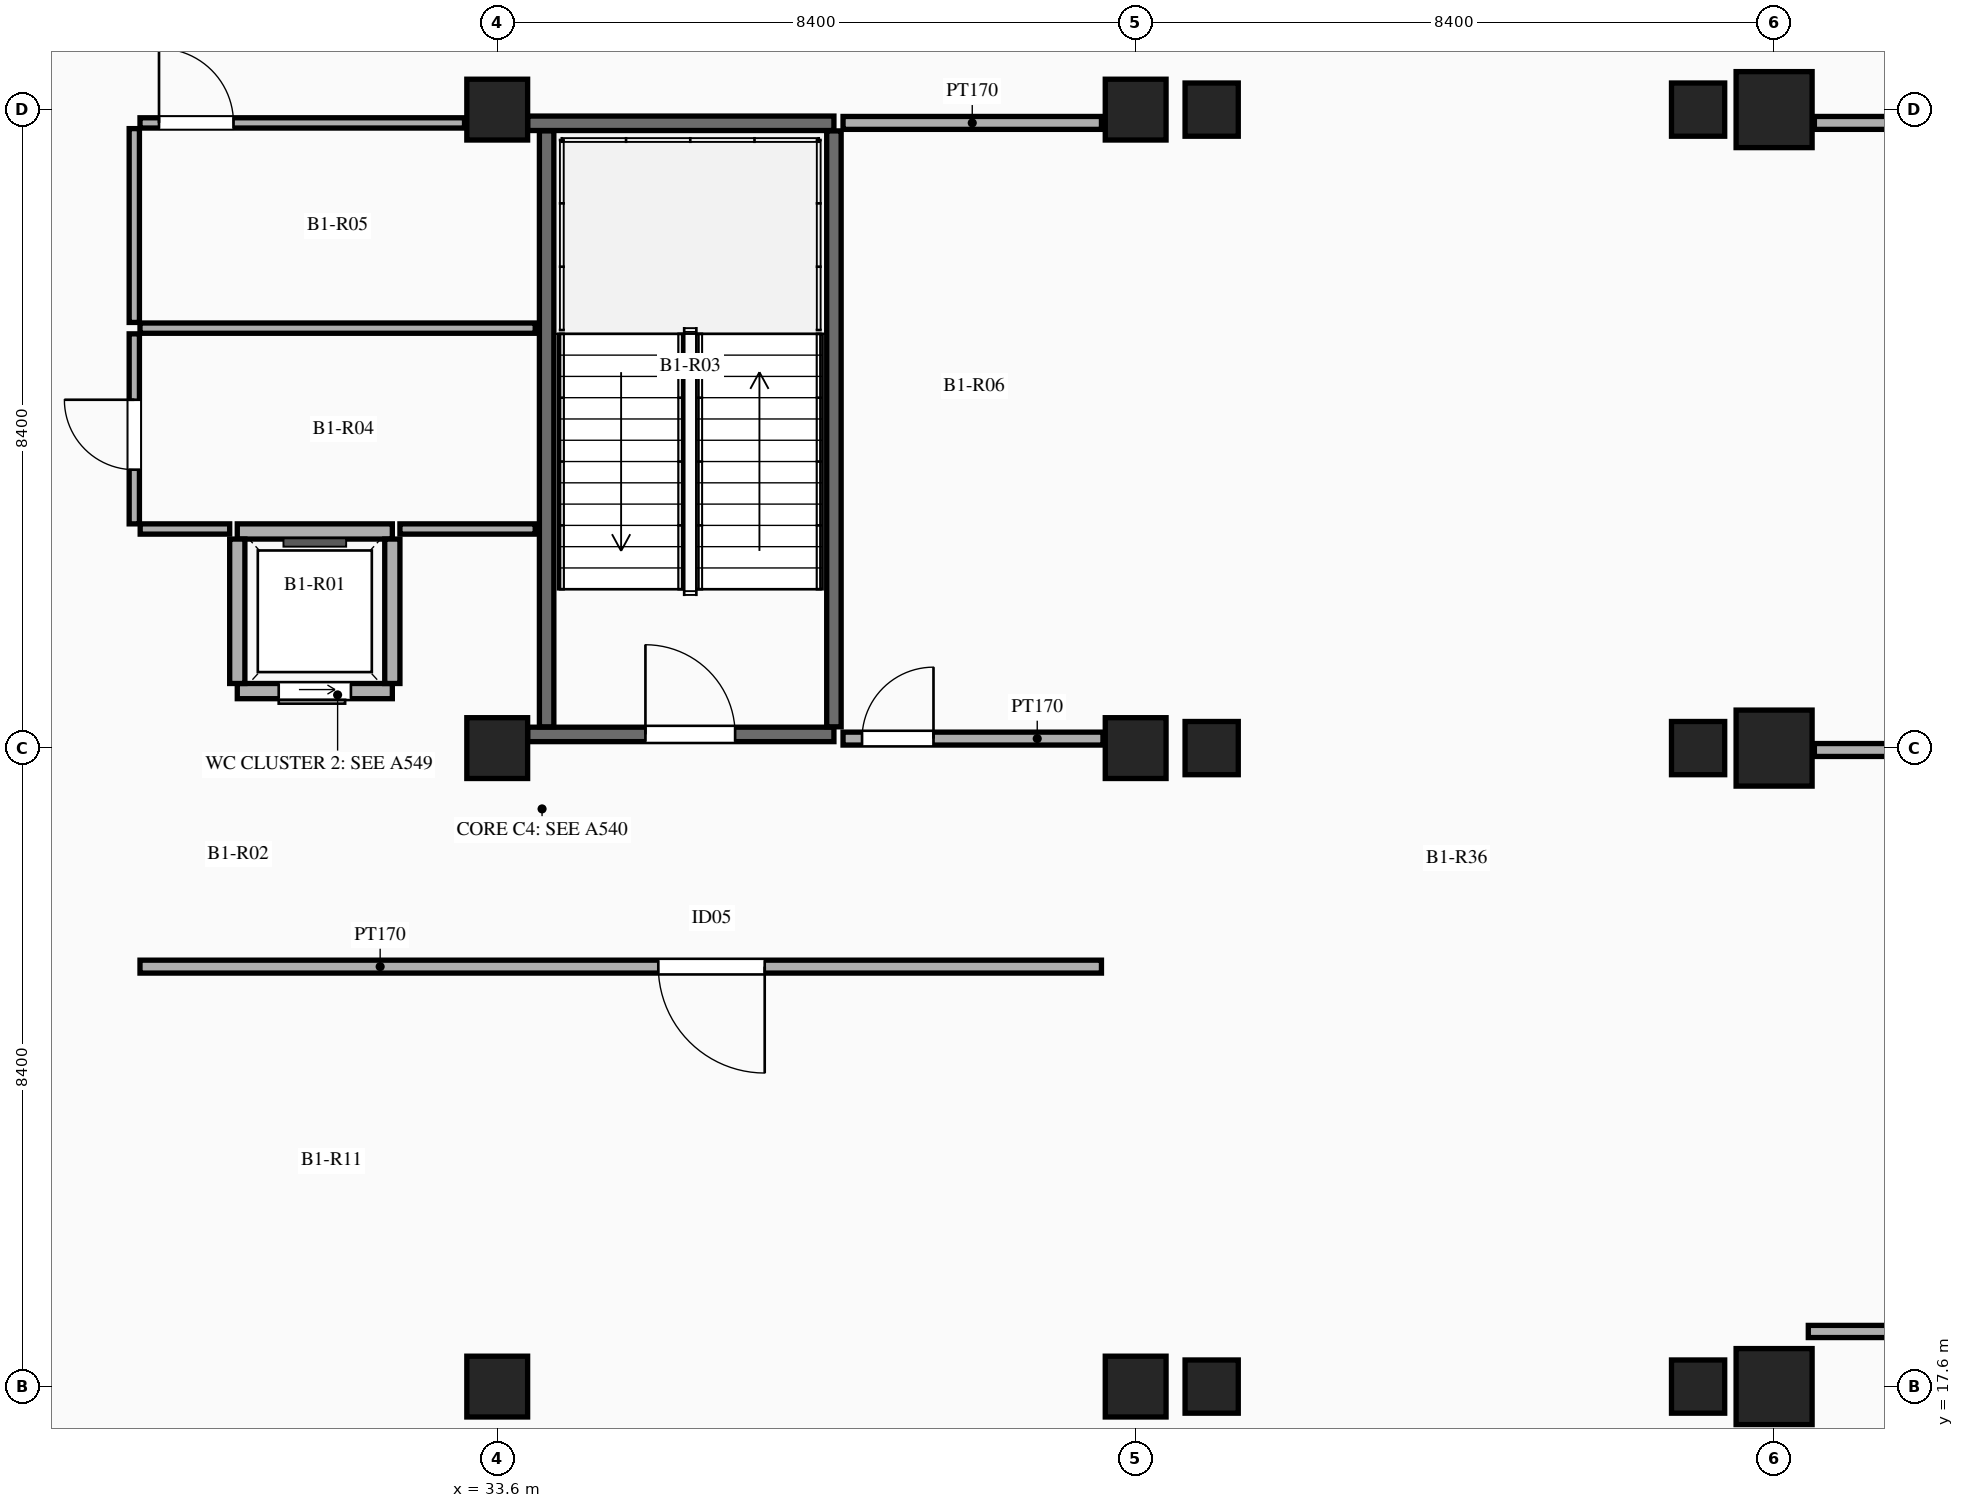
"""IFC4 building model, lengths in metres.
Left out: names, types, materials, properties, quantities, classifications, styles, units other than length and angle.
Written with IfcOpenShell. Run it as: python <this file> out.ifc"""

import sys

from ifc_helpers import new_model, si_unit, direction, frame, frame_2d, origin, origin_2d, place, context, subcontext, project, spatial, rectangle, extrude, element, fill, save


model = new_model("IFC4")
c1 = context("Model", 3, precision=1e-05, world=origin(), true_north=direction((0.0, 1.0)))
c2 = subcontext(c1, "Body", "Model", "MODEL_VIEW")
j1 = project(units=[si_unit("LENGTHUNIT", "METRE"), si_unit("PLANEANGLEUNIT", "RADIAN")], contexts=[c1])
p1 = place(None, origin())
s1 = spatial("IfcSite", under=j1, at=p1, CompositionType="ELEMENT")
p2 = place(p1, origin())
s2 = spatial("IfcBuilding", under=s1, at=p2, CompositionType="ELEMENT")
p3 = place(p2, frame((0.0, 0.0, -4.5)))
s3 = spatial("IfcBuildingStorey", under=s2, at=p3, CompositionType="ELEMENT", Elevation=-4.5)
for number, where, z_axis, x_axis in (
    (1, (50.4, 17.6, 0.0), (0.0, 0.0, 1.0), (1.0, 0.0, 0.0)),
    (2, (50.4, 26.0, 0.0), (0.0, 0.0, 1.0), (1.0, 0.0, 0.0)),
    (3, (50.4, 34.4, 0.0), (0.0, 0.0, 1.0), (1.0, 0.0, 0.0)),
):
    element("IfcColumn", number, at=place(p3, frame(where, z_axis=z_axis, x_axis=x_axis)), inside=s3, PredefinedType="COLUMN", context=c2, shape_type="SweptSolid", body=[
        extrude(rectangle(XDim=1.0, YDim=1.0, at=origin_2d()), origin(), (0.0, 0.0, 1.0), 4.5),
    ])
for number, where, z_axis, x_axis in (
    (4, (33.6, 17.6, 0.0), (0.0, 0.0, 1.0), (1.0, 0.0, 0.0)),
    (5, (33.6, 26.0, 0.0), (0.0, 0.0, 1.0), (1.0, 0.0, 0.0)),
    (6, (33.6, 34.4, 0.0), (0.0, 0.0, 1.0), (1.0, 0.0, 0.0)),
    (7, (42.0, 17.6, 0.0), (0.0, 0.0, 1.0), (1.0, 0.0, 0.0)),
    (8, (42.0, 26.0, 0.0), (0.0, 0.0, 1.0), (1.0, 0.0, 0.0)),
    (9, (42.0, 34.4, 0.0), (0.0, 0.0, 1.0), (1.0, 0.0, 0.0)),
):
    element("IfcColumn", number, at=place(p3, frame(where, z_axis=z_axis, x_axis=x_axis)), inside=s3, PredefinedType="COLUMN", context=c2, shape_type="SweptSolid", body=[
        extrude(rectangle(XDim=0.8, YDim=0.8, at=origin_2d()), origin(), (0.0, 0.0, 1.0), 4.5),
    ])
for number, where, z_axis, x_axis in (
    (10, (43.0, 17.6, 0.0), (0.0, 0.0, 1.0), (1.0, 0.0, 0.0)),
    (11, (49.4, 17.6, 0.0), (0.0, 0.0, 1.0), (1.0, 0.0, 0.0)),
    (12, (43.0, 26.0, 0.0), (0.0, 0.0, 1.0), (1.0, 0.0, 0.0)),
    (13, (49.4, 26.0, 0.0), (0.0, 0.0, 1.0), (1.0, 0.0, 0.0)),
    (14, (43.0, 34.4, 0.0), (0.0, 0.0, 1.0), (1.0, 0.0, 0.0)),
    (15, (49.4, 34.4, 0.0), (0.0, 0.0, 1.0), (1.0, 0.0, 0.0)),
):
    element("IfcColumn", number, at=place(p3, frame(where, z_axis=z_axis, x_axis=x_axis)), inside=s3, PredefinedType="COLUMN", context=c2, shape_type="SweptSolid", body=[
        extrude(rectangle(XDim=0.7, YDim=0.7, at=origin_2d()), origin(), (0.0, 0.0, 1.0), 4.5),
    ])
p4 = place(p3, frame((30.18, 26.75, 0.0), z_axis=(0.0, 0.0, 1.0), x_axis=(1.0, 0.0, 0.0)))
e16 = element("IfcWall", 16, at=p4, inside=s3, PredefinedType="SOLIDWALL", context=c2, shape_type="SweptSolid", body=[
    extrude(rectangle(XDim=2.04, YDim=0.2, at=frame_2d((1.02, 0.0))), origin(), (0.0, 0.0, 1.0), 4.3),
])
p5 = place(p4, frame((0.545, 0.0, 0.0)))
e17 = element("IfcOpeningElement", 17, at=p5, cuts=e16, PredefinedType="OPENING", context=c2, shape_type="SweptSolid", body=[
    extrude(rectangle(XDim=0.95, YDim=2.15, at=frame_2d((0.475, 1.075))), frame((0.0, 0.11, 0.0), z_axis=(0.0, -1.0, 0.0), x_axis=(1.0, 0.0, 0.0)), (0.0, 0.0, 1.0), 0.22),
])
p6 = place(p3, frame((30.18, 28.85, 0.0), z_axis=(0.0, 0.0, 1.0), x_axis=(1.0, 0.0, 0.0)))
e18 = element("IfcWall", 18, at=p6, inside=s3, PredefinedType="SOLIDWALL", context=c2, shape_type="SweptSolid", body=[
    extrude(rectangle(XDim=2.04, YDim=0.2, at=frame_2d((1.02, 0.0))), origin(), (0.0, 0.0, 1.0), 4.3),
])
for number, where, z_axis, x_axis in (
    (19, (30.18, 26.85, 0.0), (0.0, 0.0, 1.0), (0.0, 1.0, 0.0)),
    (20, (32.22, 26.85, 0.0), (0.0, 0.0, 1.0), (0.0, 1.0, 0.0)),
):
    element("IfcWall", number, at=place(p3, frame(where, z_axis=z_axis, x_axis=x_axis)), inside=s3, PredefinedType="SOLIDWALL", context=c2, shape_type="SweptSolid", body=[
        extrude(rectangle(XDim=1.9, YDim=0.2, at=frame_2d((0.95, 0.0))), origin(), (0.0, 0.0, 1.0), 4.3),
    ])
p7 = place(p3, frame((34.0, 26.18, 0.0), z_axis=(0.0, 0.0, 1.0), x_axis=(1.0, 0.0, 0.0)))
e21 = element("IfcWall", 21, at=p7, inside=s3, PredefinedType="SOLIDWALL", context=c2, shape_type="SweptSolid", body=[
    extrude(rectangle(XDim=4.03, YDim=0.19, at=frame_2d((2.015, 0.0))), origin(), (0.0, 0.0, 1.0), 4.3),
])
p8 = place(p7, frame((1.55, 0.0, 0.0)))
e22 = element("IfcOpeningElement", 22, at=p8, cuts=e21, PredefinedType="OPENING", context=c2, shape_type="SweptSolid", body=[
    extrude(rectangle(XDim=1.18, YDim=2.15, at=frame_2d((0.59, 1.075))), frame((0.0, 0.105, 0.0), z_axis=(0.0, -1.0, 0.0), x_axis=(1.0, 0.0, 0.0)), (0.0, 0.0, 1.0), 0.21),
])
p9 = place(p3, frame((34.0, 34.22, 0.0), z_axis=(0.0, 0.0, 1.0), x_axis=(1.0, 0.0, 0.0)))
e23 = element("IfcWall", 23, at=p9, inside=s3, PredefinedType="SOLIDWALL", context=c2, shape_type="SweptSolid", body=[
    extrude(rectangle(XDim=4.03, YDim=0.19, at=frame_2d((2.015, 0.0))), origin(), (0.0, 0.0, 1.0), 4.3),
])
for number, where, z_axis, x_axis in (
    (24, (34.25, 26.28, 0.0), (0.0, 0.0, 1.0), (0.0, 1.0, 0.0)),
    (25, (38.03, 26.28, 0.0), (0.0, 0.0, 1.0), (0.0, 1.0, 0.0)),
):
    element("IfcWall", number, at=place(p3, frame(where, z_axis=z_axis, x_axis=x_axis)), inside=s3, PredefinedType="SOLIDWALL", context=c2, shape_type="SweptSolid", body=[
        extrude(rectangle(XDim=7.84, YDim=0.19, at=frame_2d((3.92, 0.0))), origin(), (0.0, 0.0, 1.0), 4.3),
    ])
p10 = place(p3, frame((38.15, 26.125, 0.0), z_axis=(0.0, 0.0, 1.0), x_axis=(1.0, 0.0, 0.0)))
e26 = element("IfcWall", 26, at=p10, inside=s3, PredefinedType="PARTITIONING", context=c2, shape_type="SweptSolid", body=[
    extrude(rectangle(XDim=3.42, YDim=0.17, at=frame_2d((1.71, 0.0))), origin(), (0.0, 0.0, 1.0), 3.45),
])
p11 = place(p10, frame((0.25, 0.0, 0.0)))
e27 = element("IfcOpeningElement", 27, at=p11, cuts=e26, PredefinedType="OPENING", context=c2, shape_type="SweptSolid", body=[
    extrude(rectangle(XDim=0.94, YDim=2.1, at=frame_2d((0.47, 1.05))), frame((0.0, 0.095, 0.0), z_axis=(0.0, -1.0, 0.0), x_axis=(1.0, 0.0, 0.0)), (0.0, 0.0, 1.0), 0.19),
])
p12 = place(p3, frame((28.9, 23.125, 0.0), z_axis=(0.0, 0.0, 1.0), x_axis=(1.0, 0.0, 0.0)))
e28 = element("IfcWall", 28, at=p12, inside=s3, PredefinedType="PARTITIONING", context=c2, shape_type="SweptSolid", body=[
    extrude(rectangle(XDim=12.65, YDim=0.17, at=frame_2d((6.325, 0.0))), origin(), (0.0, 0.0, 1.0), 3.45),
])
p13 = place(p12, frame((6.819, 0.0, 0.0)))
e29 = element("IfcOpeningElement", 29, at=p13, cuts=e28, PredefinedType="OPENING", context=c2, shape_type="SweptSolid", body=[
    extrude(rectangle(XDim=1.4, YDim=2.25, at=frame_2d((0.7, 1.125))), frame((0.0, 0.095, 0.0), z_axis=(0.0, -1.0, 0.0), x_axis=(1.0, 0.0, 0.0)), (0.0, 0.0, 1.0), 0.19),
])
p14 = place(p3, frame((28.9, 31.525, 0.0), z_axis=(0.0, 0.0, 1.0), x_axis=(1.0, 0.0, 0.0)))
e30 = element("IfcWall", 30, at=p14, inside=s3, PredefinedType="PARTITIONING", context=c2, shape_type="SweptSolid", body=[
    extrude(rectangle(XDim=5.2, YDim=0.135, at=frame_2d((2.6, 0.0))), origin(), (0.0, 0.0, 1.0), 3.45),
])
p15 = place(p3, frame((28.825, 28.95, 0.0), z_axis=(0.0, 0.0, 1.0), x_axis=(0.0, 1.0, 0.0)))
e31 = element("IfcWall", 31, at=p15, inside=s3, PredefinedType="PARTITIONING", context=c2, shape_type="SweptSolid", body=[
    extrude(rectangle(XDim=2.5, YDim=0.135, at=frame_2d((1.25, 0.0))), origin(), (0.0, 0.0, 1.0), 3.45),
])
p16 = place(p15, frame((0.713, 0.0, 0.0)))
e32 = element("IfcOpeningElement", 32, at=p16, cuts=e31, PredefinedType="OPENING", context=c2, shape_type="SweptSolid", body=[
    extrude(rectangle(XDim=0.92, YDim=2.12, at=frame_2d((0.46, 1.06))), frame((0.0, 0.077, 0.0), z_axis=(0.0, -1.0, 0.0), x_axis=(1.0, 0.0, 0.0)), (0.0, 0.0, 1.0), 0.155),
])
p17 = place(p3, frame((28.825, 31.6, 0.0), z_axis=(0.0, 0.0, 1.0), x_axis=(0.0, 1.0, 0.0)))
e33 = element("IfcWall", 33, at=p17, inside=s3, PredefinedType="PARTITIONING", context=c2, shape_type="SweptSolid", body=[
    extrude(rectangle(XDim=2.55, YDim=0.135, at=frame_2d((1.275, 0.0))), origin(), (0.0, 0.0, 1.0), 3.45),
])
p18 = place(p3, frame((28.9, 34.225, 0.0), z_axis=(0.0, 0.0, 1.0), x_axis=(1.0, 0.0, 0.0)))
e34 = element("IfcWall", 34, at=p18, inside=s3, PredefinedType="PARTITIONING", context=c2, shape_type="SweptSolid", body=[
    extrude(rectangle(XDim=4.27, YDim=0.135, at=frame_2d((2.135, 0.0))), origin(), (0.0, 0.0, 1.0), 3.45),
])
p19 = place(p18, frame((0.25, 0.0, 0.0)))
e35 = element("IfcOpeningElement", 35, at=p19, cuts=e34, PredefinedType="OPENING", context=c2, shape_type="SweptSolid", body=[
    extrude(rectangle(XDim=0.98, YDim=2.15, at=frame_2d((0.49, 1.075))), frame((0.0, 0.077, 0.0), z_axis=(0.0, -1.0, 0.0), x_axis=(1.0, 0.0, 0.0)), (0.0, 0.0, 1.0), 0.155),
])
p20 = place(p3, frame((38.15, 34.225, 0.0), z_axis=(0.0, 0.0, 1.0), x_axis=(1.0, 0.0, 0.0)))
e36 = element("IfcWall", 36, at=p20, inside=s3, PredefinedType="PARTITIONING", context=c2, shape_type="SweptSolid", body=[
    extrude(rectangle(XDim=3.4, YDim=0.17, at=frame_2d((1.7, 0.0))), origin(), (0.0, 0.0, 1.0), 3.45),
])
p21 = place(p3, frame((50.93, 25.975, 0.0), z_axis=(0.0, 0.0, 1.0), x_axis=(1.0, 0.0, 0.0)))
e37 = element("IfcWall", 37, at=p21, inside=s3, PredefinedType="PARTITIONING", context=c2, shape_type="SweptSolid", body=[
    extrude(rectangle(XDim=7.52, YDim=0.17, at=frame_2d((3.76, 0.0))), origin(), (0.0, 0.0, 1.0), 3.45),
])
p22 = place(p21, frame((2.984, 0.0, 0.0)))
e38 = element("IfcOpeningElement", 38, at=p22, cuts=e37, PredefinedType="OPENING", context=c2, shape_type="SweptSolid", body=[
    extrude(rectangle(XDim=1.4, YDim=2.25, at=frame_2d((0.7, 1.125))), frame((0.0, 0.095, 0.0), z_axis=(0.0, -1.0, 0.0), x_axis=(1.0, 0.0, 0.0)), (0.0, 0.0, 1.0), 0.19),
])
p23 = place(p3, frame((50.93, 34.225, 0.0), z_axis=(0.0, 0.0, 1.0), x_axis=(1.0, 0.0, 0.0)))
e39 = element("IfcWall", 39, at=p23, inside=s3, PredefinedType="PARTITIONING", context=c2, shape_type="SweptSolid", body=[
    extrude(rectangle(XDim=7.52, YDim=0.17, at=frame_2d((3.76, 0.0))), origin(), (0.0, 0.0, 1.0), 3.45),
])
p24 = place(p3, frame((50.85, 18.325, 0.0), z_axis=(0.0, 0.0, 1.0), x_axis=(1.0, 0.0, 0.0)))
e40 = element("IfcWall", 40, at=p24, inside=s3, PredefinedType="PARTITIONING", context=c2, shape_type="SweptSolid", body=[
    extrude(rectangle(XDim=27.75, YDim=0.16, at=frame_2d((13.875, 0.0))), origin(), (0.0, 0.0, 1.0), 3.45),
])
p25 = place(p24, frame((13.305, 0.0, 0.0)))
e41 = element("IfcOpeningElement", 41, at=p25, cuts=e40, PredefinedType="OPENING", context=c2, shape_type="SweptSolid", body=[
    extrude(rectangle(XDim=1.14, YDim=2.22, at=frame_2d((0.57, 1.11))), frame((0.0, 0.09, 0.0), z_axis=(0.0, -1.0, 0.0), x_axis=(1.0, 0.0, 0.0)), (0.0, 0.0, 1.0), 0.18),
])
p26 = place(p3, frame((28.903, 28.883, 0.0), z_axis=(0.0, 0.0, 1.0), x_axis=(1.0, 0.0, 0.0)))
e42 = element("IfcWall", 42, at=p26, inside=s3, PredefinedType="PARTITIONING", context=c2, shape_type="SweptSolid", body=[
    extrude(rectangle(XDim=1.177, YDim=0.135, at=frame_2d((0.589, 0.0))), origin(), (0.0, 0.0, 1.0), 3.45),
])
p27 = place(p3, frame((32.32, 28.883, 0.0), z_axis=(0.0, 0.0, 1.0), x_axis=(1.0, 0.0, 0.0)))
e43 = element("IfcWall", 43, at=p27, inside=s3, PredefinedType="PARTITIONING", context=c2, shape_type="SweptSolid", body=[
    extrude(rectangle(XDim=1.78, YDim=0.135, at=frame_2d((0.89, 0.0))), origin(), (0.0, 0.0, 1.0), 3.45),
])
p28 = place(p5, frame((0.95, 0.0, 0.0), z_axis=(0.0, 0.0, 1.0), x_axis=(-1.0, 0.0, 0.0)))
e44 = element("IfcDoor", 44, at=p28, inside=s3, OperationType="SLIDING_TO_LEFT", PredefinedType="DOOR", context=c2, shape_type="SweptSolid", body=[
    extrude(rectangle(XDim=0.95, YDim=2.15, at=frame_2d((0.475, 1.075))), frame((0.0, 0.025, 0.0), z_axis=(0.0, -1.0, 0.0), x_axis=(1.0, 0.0, 0.0)), (0.0, 0.0, 1.0), 0.05),
])
fill(e17, e44)
p29 = place(p8, origin())
e45 = element("IfcDoor", 45, at=p29, inside=s3, OperationType="SINGLE_SWING_LEFT", PredefinedType="DOOR", context=c2, shape_type="SweptSolid", body=[
    extrude(rectangle(XDim=1.18, YDim=2.15, at=frame_2d((0.59, 1.075))), frame((0.0, 0.025, 0.0), z_axis=(0.0, -1.0, 0.0), x_axis=(1.0, 0.0, 0.0)), (0.0, 0.0, 1.0), 0.05),
])
fill(e22, e45)
p30 = place(p16, origin())
e46 = element("IfcDoor", 46, at=p30, inside=s3, OperationType="SINGLE_SWING_RIGHT", PredefinedType="DOOR", context=c2, shape_type="SweptSolid", body=[
    extrude(rectangle(XDim=0.92, YDim=2.12, at=frame_2d((0.46, 1.06))), frame((0.0, 0.025, 0.0), z_axis=(0.0, -1.0, 0.0), x_axis=(1.0, 0.0, 0.0)), (0.0, 0.0, 1.0), 0.05),
])
fill(e32, e46)
p31 = place(p19, origin())
e47 = element("IfcDoor", 47, at=p31, inside=s3, OperationType="SINGLE_SWING_LEFT", PredefinedType="DOOR", context=c2, shape_type="SweptSolid", body=[
    extrude(rectangle(XDim=0.98, YDim=2.15, at=frame_2d((0.49, 1.075))), frame((0.0, 0.025, 0.0), z_axis=(0.0, -1.0, 0.0), x_axis=(1.0, 0.0, 0.0)), (0.0, 0.0, 1.0), 0.05),
])
fill(e35, e47)
p32 = place(p11, origin())
e48 = element("IfcDoor", 48, at=p32, inside=s3, OperationType="SINGLE_SWING_RIGHT", PredefinedType="DOOR", context=c2, shape_type="SweptSolid", body=[
    extrude(rectangle(XDim=0.94, YDim=2.1, at=frame_2d((0.47, 1.05))), frame((0.0, 0.025, 0.0), z_axis=(0.0, -1.0, 0.0), x_axis=(1.0, 0.0, 0.0)), (0.0, 0.0, 1.0), 0.05),
])
fill(e27, e48)
p33 = place(p13, frame((1.4, 0.0, 0.0), z_axis=(0.0, 0.0, 1.0), x_axis=(-1.0, 0.0, 0.0)))
e49 = element("IfcDoor", 49, at=p33, inside=s3, OperationType="SINGLE_SWING_LEFT", PredefinedType="DOOR", context=c2, shape_type="SweptSolid", body=[
    extrude(rectangle(XDim=1.4, YDim=2.25, at=frame_2d((0.7, 1.125))), frame((0.0, 0.025, 0.0), z_axis=(0.0, -1.0, 0.0), x_axis=(1.0, 0.0, 0.0)), (0.0, 0.0, 1.0), 0.05),
])
fill(e29, e49)
save(model, sys.argv[1])
